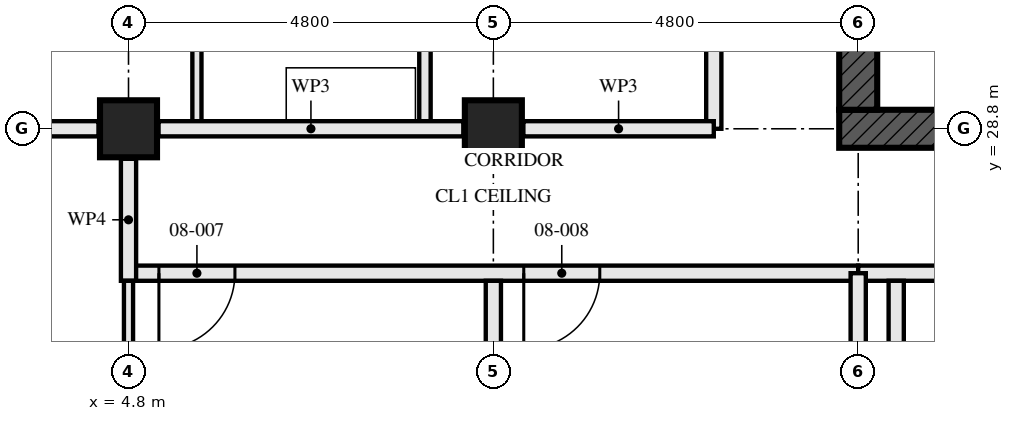
"""IFC4 building model, lengths in metres.
Left out: names, types, materials, properties, quantities, classifications, styles, units other than length and angle.
Written with IfcOpenShell. Run it as: python <this file> out.ifc"""

import sys

from ifc_helpers import new_model, si_unit, direction, frame, frame_2d, origin, origin_2d, place, context, subcontext, project, spatial, rectangle, hollow_rectangle, extrude, element, fill, save


model = new_model("IFC4")
c1 = context("Model", 3, precision=1e-05, world=origin(), true_north=direction((0.0, 1.0)))
c2 = subcontext(c1, "Body", "Model", "MODEL_VIEW")
j1 = project(units=[si_unit("LENGTHUNIT", "METRE"), si_unit("PLANEANGLEUNIT", "RADIAN")], contexts=[c1])
p1 = place(None, origin())
s1 = spatial("IfcSite", under=j1, at=p1, CompositionType="ELEMENT")
p2 = place(p1, origin())
s2 = spatial("IfcBuilding", under=s1, at=p2, CompositionType="ELEMENT")
p3 = place(p2, frame((0.0, 0.0, 34.0)))
s3 = spatial("IfcBuildingStorey", under=s2, at=p3, CompositionType="ELEMENT", Elevation=34.0)
for number, where, z_axis, x_axis in (
    (1, (4.8, 28.8, 0.0), (0.0, 0.0, 1.0), (0.0, 1.0, 0.0)),
    (2, (9.6, 28.8, 0.0), (0.0, 0.0, 1.0), (0.0, 1.0, 0.0)),
):
    element("IfcColumn", number, at=place(p3, frame(where, z_axis=z_axis, x_axis=x_axis)), inside=s3, PredefinedType="COLUMN", context=c2, shape_type="SweptSolid", body=[
        extrude(hollow_rectangle(XDim=0.75, YDim=0.75, WallThickness=0.08, at=origin_2d()), origin(), (0.0, 0.0, 1.0), 3.5),
    ])
p4 = place(p3, frame((14.15, 28.8, -0.17), z_axis=(0.0, 0.0, 1.0), x_axis=(1.0, 0.0, 0.0)))
e3 = element("IfcWall", 3, at=p4, inside=s3, PredefinedType="SHEAR", context=c2, shape_type="SweptSolid", body=[
    extrude(rectangle(XDim=14.9, YDim=0.5, at=frame_2d((7.45, 0.0))), origin(), (0.0, 0.0, 1.0), 3.5),
])
p5 = place(p4, frame((6.85, 0.0, 0.17)))
e4 = element("IfcOpeningElement", 4, at=p5, cuts=e3, PredefinedType="OPENING", context=c2, shape_type="SweptSolid", body=[
    extrude(rectangle(XDim=1.2, YDim=2.1, at=frame_2d((0.6, 1.05))), frame((0.0, 0.26, 0.0), z_axis=(0.0, -1.0, 0.0), x_axis=(1.0, 0.0, 0.0)), (0.0, 0.0, 1.0), 0.521),
])
p6 = place(p3, frame((14.4, 42.95, -0.17), z_axis=(0.0, 0.0, 1.0), x_axis=(0.0, -1.0, 0.0)))
e5 = element("IfcWall", 5, at=p6, inside=s3, PredefinedType="SHEAR", context=c2, shape_type="SweptSolid", body=[
    extrude(rectangle(XDim=13.9, YDim=0.5, at=frame_2d((6.95, 0.0))), origin(), (0.0, 0.0, 1.0), 3.5),
])
p7 = place(p6, frame((6.35, 0.0, 0.17)))
e6 = element("IfcOpeningElement", 6, at=p7, cuts=e5, PredefinedType="OPENING", context=c2, shape_type="SweptSolid", body=[
    extrude(rectangle(XDim=1.2, YDim=2.1, at=frame_2d((0.6, 1.05))), frame((0.0, 0.26, 0.0), z_axis=(0.0, -1.0, 0.0), x_axis=(1.0, 0.0, 0.0)), (0.0, 0.0, 1.0), 0.521),
])
p8 = place(p3, frame((4.8, 23.8, 0.0), z_axis=(0.0, 0.0, 1.0), x_axis=(0.0, 1.0, 0.0)))
e7 = element("IfcWall", 7, at=p8, inside=s3, PredefinedType="PARTITIONING", context=c2, shape_type="SweptSolid", body=[
    extrude(rectangle(XDim=3.0, YDim=0.12, at=frame_2d((1.5, 0.0))), origin(), (0.0, 0.0, 1.0), 2.55),
])
p9 = place(p8, frame((1.075, 0.0, 0.0)))
e8 = element("IfcOpeningElement", 8, at=p9, cuts=e7, PredefinedType="OPENING", context=c2, shape_type="SweptSolid", body=[
    extrude(rectangle(XDim=0.9, YDim=2.1, at=frame_2d((0.45, 1.05))), frame((0.0, 0.071, 0.0), z_axis=(0.0, -1.0, 0.0), x_axis=(1.0, 0.0, 0.0)), (0.0, 0.0, 1.0), 0.141),
])
p10 = place(p3, frame((9.6, 14.647, 0.0), z_axis=(0.0, 0.0, 1.0), x_axis=(0.0, 1.0, 0.0)))
e9 = element("IfcWall", 9, at=p10, inside=s3, PredefinedType="PARTITIONING", context=c2, shape_type="SweptSolid", body=[
    extrude(rectangle(XDim=12.153, YDim=0.2, at=frame_2d((6.077, 0.0))), origin(), (0.0, 0.0, 1.0), 2.55),
])
p11 = place(p3, frame((4.8, 26.9, 0.0), z_axis=(0.0, 0.0, 1.0), x_axis=(1.0, 0.0, 0.0)))
e10 = element("IfcWall", 10, at=p11, inside=s3, PredefinedType="PARTITIONING", context=c2, shape_type="SweptSolid", body=[
    extrude(rectangle(XDim=9.6, YDim=0.2, at=frame_2d((4.8, 0.0))), origin(), (0.0, 0.0, 1.0), 3.33),
])
p12 = place(p11, frame((0.4, 0.0, 0.0)))
e11 = element("IfcOpeningElement", 11, at=p12, cuts=e10, PredefinedType="OPENING", context=c2, shape_type="SweptSolid", body=[
    extrude(rectangle(XDim=1.0, YDim=2.1, at=frame_2d((0.5, 1.05))), frame((0.0, 0.111, 0.0), z_axis=(0.0, -1.0, 0.0), x_axis=(1.0, 0.0, 0.0)), (0.0, 0.0, 1.0), 0.221),
])
p13 = place(p11, frame((5.2, 0.0, 0.0)))
e12 = element("IfcOpeningElement", 12, at=p13, cuts=e10, PredefinedType="OPENING", context=c2, shape_type="SweptSolid", body=[
    extrude(rectangle(XDim=1.0, YDim=2.1, at=frame_2d((0.5, 1.05))), frame((0.0, 0.111, 0.0), z_axis=(0.0, -1.0, 0.0), x_axis=(1.0, 0.0, 0.0)), (0.0, 0.0, 1.0), 0.221),
])
p14 = place(p3, frame((4.8, 26.8, 0.0), z_axis=(0.0, 0.0, 1.0), x_axis=(0.0, 1.0, 0.0)))
e13 = element("IfcWall", 13, at=p14, inside=s3, PredefinedType="PARTITIONING", context=c2, shape_type="SweptSolid", body=[
    extrude(rectangle(XDim=1.605, YDim=0.2, at=frame_2d((0.802, 0.0))), origin(), (0.0, 0.0, 1.0), 3.33),
])
p15 = place(p3, frame((8.7, 31.6, 0.0), z_axis=(0.0, 0.0, 1.0), x_axis=(0.0, -1.0, 0.0)))
e14 = element("IfcWall", 14, at=p15, inside=s3, PredefinedType="PARTITIONING", context=c2, shape_type="SweptSolid", body=[
    extrude(rectangle(XDim=2.8, YDim=0.15, at=frame_2d((1.4, 0.0))), origin(), (0.0, 0.0, 1.0), 3.33),
])
p16 = place(p3, frame((5.7, 33.6, 0.0), z_axis=(0.0, 0.0, 1.0), x_axis=(0.0, -1.0, 0.0)))
e15 = element("IfcWall", 15, at=p16, inside=s3, PredefinedType="PARTITIONING", context=c2, shape_type="SweptSolid", body=[
    extrude(rectangle(XDim=4.8, YDim=0.12, at=frame_2d((2.4, 0.0))), origin(), (0.0, 0.0, 1.0), 3.33),
])
p17 = place(p16, frame((0.45, 0.0, 0.0)))
e16 = element("IfcOpeningElement", 16, at=p17, cuts=e15, PredefinedType="OPENING", context=c2, shape_type="SweptSolid", body=[
    extrude(rectangle(XDim=0.9, YDim=2.1, at=frame_2d((0.45, 1.05))), frame((0.0, 0.071, 0.0), z_axis=(0.0, -1.0, 0.0), x_axis=(1.0, 0.0, 0.0)), (0.0, 0.0, 1.0), 0.141),
])
p18 = place(p3, frame((12.5, 43.2, 0.0), z_axis=(0.0, 0.0, 1.0), x_axis=(0.0, -1.0, 0.0)))
e17 = element("IfcWall", 17, at=p18, inside=s3, PredefinedType="PARTITIONING", context=c2, shape_type="SweptSolid", body=[
    extrude(rectangle(XDim=14.4, YDim=0.2, at=frame_2d((7.2, 0.0))), origin(), (0.0, 0.0, 1.0), 2.55),
])
p19 = place(p18, frame((1.4, 0.0, 0.0)))
e18 = element("IfcOpeningElement", 18, at=p19, cuts=e17, PredefinedType="OPENING", context=c2, shape_type="SweptSolid", body=[
    extrude(rectangle(XDim=1.0, YDim=2.1, at=frame_2d((0.5, 1.05))), frame((0.0, 0.111, 0.0), z_axis=(0.0, -1.0, 0.0), x_axis=(1.0, 0.0, 0.0)), (0.0, 0.0, 1.0), 0.221),
])
p20 = place(p18, frame((5.2, 0.0, 0.0)))
e19 = element("IfcOpeningElement", 19, at=p20, cuts=e17, PredefinedType="OPENING", context=c2, shape_type="SweptSolid", body=[
    extrude(rectangle(XDim=1.0, YDim=2.1, at=frame_2d((0.5, 1.05))), frame((0.0, 0.111, 0.0), z_axis=(0.0, -1.0, 0.0), x_axis=(1.0, 0.0, 0.0)), (0.0, 0.0, 1.0), 0.221),
])
p21 = place(p18, frame((10.0, 0.0, 0.0)))
e20 = element("IfcOpeningElement", 20, at=p21, cuts=e17, PredefinedType="OPENING", context=c2, shape_type="SweptSolid", body=[
    extrude(rectangle(XDim=1.0, YDim=2.1, at=frame_2d((0.5, 1.05))), frame((0.0, 0.111, 0.0), z_axis=(0.0, -1.0, 0.0), x_axis=(1.0, 0.0, 0.0)), (0.0, 0.0, 1.0), 0.221),
])
p22 = place(p3, frame((14.9, 22.1, 0.0), z_axis=(0.0, 0.0, 1.0), x_axis=(0.0, 1.0, 0.0)))
e21 = element("IfcWall", 21, at=p22, inside=s3, PredefinedType="SOLIDWALL", context=c2, shape_type="SweptSolid", body=[
    extrude(rectangle(XDim=4.7, YDim=0.2, at=frame_2d((2.35, 0.0))), origin(), (0.0, 0.0, 1.0), 2.99),
])
p23 = place(p3, frame((14.4, 26.9, 0.0), z_axis=(0.0, 0.0, 1.0), x_axis=(1.0, 0.0, 0.0)))
e22 = element("IfcWall", 22, at=p23, inside=s3, PredefinedType="PARTITIONING", context=c2, shape_type="SweptSolid", body=[
    extrude(rectangle(XDim=14.4, YDim=0.2, at=frame_2d((7.2, 0.0))), origin(), (0.0, 0.0, 1.0), 2.55),
])
p24 = place(p23, frame((1.4, 0.0, 0.0)))
e23 = element("IfcOpeningElement", 23, at=p24, cuts=e22, PredefinedType="OPENING", context=c2, shape_type="SweptSolid", body=[
    extrude(rectangle(XDim=1.0, YDim=2.1, at=frame_2d((0.5, 1.05))), frame((0.0, 0.111, 0.0), z_axis=(0.0, -1.0, 0.0), x_axis=(1.0, 0.0, 0.0)), (0.0, 0.0, 1.0), 0.221),
])
p25 = place(p23, frame((5.2, 0.0, 0.0)))
e24 = element("IfcOpeningElement", 24, at=p25, cuts=e22, PredefinedType="OPENING", context=c2, shape_type="SweptSolid", body=[
    extrude(rectangle(XDim=1.0, YDim=2.1, at=frame_2d((0.5, 1.05))), frame((0.0, 0.111, 0.0), z_axis=(0.0, -1.0, 0.0), x_axis=(1.0, 0.0, 0.0)), (0.0, 0.0, 1.0), 0.221),
])
p26 = place(p23, frame((10.0, 0.0, 0.0)))
e25 = element("IfcOpeningElement", 25, at=p26, cuts=e22, PredefinedType="OPENING", context=c2, shape_type="SweptSolid", body=[
    extrude(rectangle(XDim=1.0, YDim=2.1, at=frame_2d((0.5, 1.05))), frame((0.0, 0.111, 0.0), z_axis=(0.0, -1.0, 0.0), x_axis=(1.0, 0.0, 0.0)), (0.0, 0.0, 1.0), 0.221),
])
p27 = place(p3, frame((12.5, 28.8, 0.0), z_axis=(0.0, 0.0, 1.0), x_axis=(-1.0, 0.0, 0.0)))
e26 = element("IfcWall", 26, at=p27, inside=s3, PredefinedType="PARTITIONING", context=c2, shape_type="SweptSolid", body=[
    extrude(rectangle(XDim=2.505, YDim=0.2, at=frame_2d((1.252, 0.0))), origin(), (0.0, 0.0, 1.0), 2.32),
])
p28 = place(p3, frame((9.205, 28.8, 0.0), z_axis=(0.0, 0.0, 1.0), x_axis=(-1.0, 0.0, 0.0)))
e27 = element("IfcWall", 27, at=p28, inside=s3, PredefinedType="PARTITIONING", context=c2, shape_type="SweptSolid", body=[
    extrude(rectangle(XDim=4.01, YDim=0.2, at=frame_2d((2.005, 0.0))), origin(), (0.0, 0.0, 1.0), 2.32),
])
p29 = place(p3, frame((4.405, 28.8, 0.0), z_axis=(0.0, 0.0, 1.0), x_axis=(-1.0, 0.0, 0.0)))
e28 = element("IfcWall", 28, at=p29, inside=s3, PredefinedType="PARTITIONING", context=c2, shape_type="SweptSolid", body=[
    extrude(rectangle(XDim=4.101, YDim=0.2, at=frame_2d((2.05, 0.0))), origin(), (0.0, 0.0, 1.0), 2.32),
])
p30 = place(p3, frame((14.4, 24.395, 0.0), z_axis=(0.0, 0.0, 1.0), x_axis=(0.0, 1.0, 0.0)))
e29 = element("IfcWall", 29, at=p30, inside=s3, PredefinedType="PARTITIONING", context=c2, shape_type="SweptSolid", body=[
    extrude(rectangle(XDim=2.505, YDim=0.2, at=frame_2d((1.252, 0.0))), origin(), (0.0, 0.0, 1.0), 2.32),
])
p31 = place(p12, frame((1.0, 0.0, 0.0), z_axis=(0.0, 0.0, 1.0), x_axis=(-1.0, 0.0, 0.0)))
e30 = element("IfcDoor", 30, at=p31, inside=s3, OperationType="SINGLE_SWING_LEFT", PredefinedType="DOOR", context=c2, shape_type="SweptSolid", body=[
    extrude(rectangle(XDim=1.0, YDim=2.1, at=frame_2d((0.5, 1.05))), frame((0.0, 0.027, 0.0), z_axis=(0.0, -1.0, 0.0), x_axis=(1.0, 0.0, 0.0)), (0.0, 0.0, 1.0), 0.054),
])
fill(e11, e30)
p32 = place(p13, frame((1.0, 0.0, 0.0), z_axis=(0.0, 0.0, 1.0), x_axis=(-1.0, 0.0, 0.0)))
e31 = element("IfcDoor", 31, at=p32, inside=s3, OperationType="SINGLE_SWING_LEFT", PredefinedType="DOOR", context=c2, shape_type="SweptSolid", body=[
    extrude(rectangle(XDim=1.0, YDim=2.1, at=frame_2d((0.5, 1.05))), frame((0.0, 0.027, 0.0), z_axis=(0.0, -1.0, 0.0), x_axis=(1.0, 0.0, 0.0)), (0.0, 0.0, 1.0), 0.054),
])
fill(e12, e31)
save(model, sys.argv[1])
